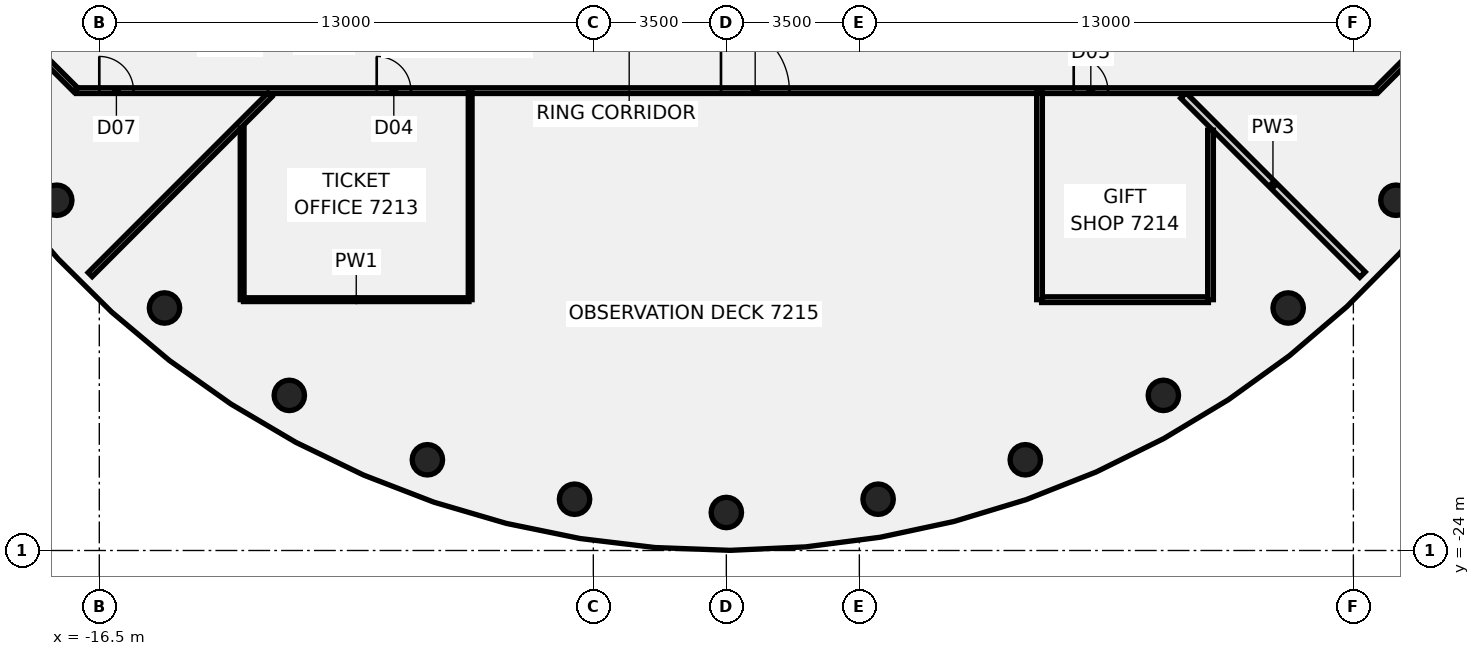
"""IFC4 building model, lengths in metres.
Left out: names, types, materials, properties, quantities, classifications, styles, units other than length and angle.
Written with IfcOpenShell. Run it as: python <this file> out.ifc"""

import sys

from ifc_helpers import new_model, si_unit, direction, frame, frame_2d, origin, origin_2d, place, context, subcontext, project, spatial, rectangle, circle, extrude, element, fill, save


model = new_model("IFC4")
c1 = context("Model", 3, precision=1e-05, world=origin(), true_north=direction((0.0, 1.0)))
c2 = subcontext(c1, "Body", "Model", "MODEL_VIEW")
j1 = project(units=[si_unit("LENGTHUNIT", "METRE"), si_unit("PLANEANGLEUNIT", "RADIAN")], contexts=[c1])
p1 = place(None, origin())
s1 = spatial("IfcSite", under=j1, at=p1, CompositionType="ELEMENT")
p2 = place(p1, origin())
s2 = spatial("IfcBuilding", under=s1, at=p2, CompositionType="ELEMENT")
p3 = place(p2, frame((0.0, 0.0, 287.4)))
s3 = spatial("IfcBuildingStorey", under=s2, at=p3, CompositionType="ELEMENT", Elevation=287.4)
for number, where, z_axis, x_axis in (
    (1, (-17.619, -14.784, -0.2), (0.0, 0.0, 1.0), (1.0, 0.0, 0.0)),
    (2, (-14.784, -17.619, -0.2), (0.0, 0.0, 1.0), (1.0, 0.0, 0.0)),
    (3, (-11.5, -19.919, -0.2), (0.0, 0.0, 1.0), (1.0, 0.0, 0.0)),
    (4, (-7.866, -21.613, -0.2), (0.0, 0.0, 1.0), (1.0, 0.0, 0.0)),
    (5, (-3.994, -22.651, -0.2), (0.0, 0.0, 1.0), (1.0, 0.0, 0.0)),
    (6, (0.0, -23.0, -0.2), (0.0, 0.0, 1.0), (1.0, 0.0, 0.0)),
    (7, (3.994, -22.651, -0.2), (0.0, 0.0, 1.0), (1.0, 0.0, 0.0)),
    (8, (7.866, -21.613, -0.2), (0.0, 0.0, 1.0), (1.0, 0.0, 0.0)),
    (9, (11.5, -19.919, -0.2), (0.0, 0.0, 1.0), (1.0, 0.0, 0.0)),
    (10, (14.784, -17.619, -0.2), (0.0, 0.0, 1.0), (1.0, 0.0, 0.0)),
    (11, (17.619, -14.784, -0.2), (0.0, 0.0, 1.0), (1.0, 0.0, 0.0)),
):
    element("IfcColumn", number, at=place(p3, frame(where, z_axis=z_axis, x_axis=x_axis)), inside=s3, PredefinedType="COLUMN", context=c2, shape_type="SweptSolid", body=[
        extrude(circle(Radius=0.4, at=origin_2d()), origin(), (0.0, 0.0, 1.0), 7.0),
    ])
p4 = place(p3, frame((-18.872, -10.128, 0.0), z_axis=(0.0, 0.0, 1.0), x_axis=(0.707106781187, -0.707106781187, 0.0)))
e12 = element("IfcWall", 12, at=p4, inside=s3, PredefinedType="PARTITIONING", context=c2, shape_type="SweptSolid", body=[
    extrude(rectangle(XDim=2.465, YDim=0.15, at=frame_2d((1.232, 0.0))), origin(), (0.0, 0.0, 1.0), 6.1),
])
p5 = place(p3, frame((12.027, -12.027, 0.0), z_axis=(0.0, 0.0, 1.0), x_axis=(0.707106781187, -0.707106781187, 0.0)))
e13 = element("IfcWall", 13, at=p5, inside=s3, PredefinedType="PARTITIONING", context=c2, shape_type="SweptSolid", body=[
    extrude(rectangle(XDim=6.665, YDim=0.2, at=frame_2d((3.333, 0.0))), origin(), (0.0, 0.0, 1.0), 6.1),
])
p6 = place(p3, frame((-17.1, -11.9, 0.0), z_axis=(0.0, 0.0, 1.0), x_axis=(1.0, 0.0, 0.0)))
e14 = element("IfcWall", 14, at=p6, inside=s3, PredefinedType="PARTITIONING", context=c2, shape_type="SweptSolid", body=[
    extrude(rectangle(XDim=34.165, YDim=0.15, at=frame_2d((17.083, 0.0))), origin(), (0.0, 0.0, 1.0), 6.1),
])
p7 = place(p6, frame((7.9, 0.0, 0.0)))
e15 = element("IfcOpeningElement", 15, at=p7, cuts=e14, PredefinedType="OPENING", context=c2, shape_type="SweptSolid", body=[
    extrude(rectangle(XDim=0.9, YDim=2.1, at=frame_2d((0.45, 1.05))), frame((0.0, 0.085, 0.0), z_axis=(0.0, -1.0, 0.0), x_axis=(1.0, 0.0, 0.0)), (0.0, 0.0, 1.0), 0.17),
])
p8 = place(p6, frame((26.241, 0.0, 0.0)))
e16 = element("IfcOpeningElement", 16, at=p8, cuts=e14, PredefinedType="OPENING", context=c2, shape_type="SweptSolid", body=[
    extrude(rectangle(XDim=0.9, YDim=2.1, at=frame_2d((0.45, 1.05))), frame((0.0, 0.085, 0.0), z_axis=(0.0, -1.0, 0.0), x_axis=(1.0, 0.0, 0.0)), (0.0, 0.0, 1.0), 0.17),
])
p9 = place(p6, frame((16.959, 0.0, 0.0)))
e17 = element("IfcOpeningElement", 17, at=p9, cuts=e14, PredefinedType="OPENING", context=c2, shape_type="SweptSolid", body=[
    extrude(rectangle(XDim=1.8, YDim=2.1, at=frame_2d((0.9, 1.05))), frame((0.0, 0.085, 0.0), z_axis=(0.0, -1.0, 0.0), x_axis=(1.0, 0.0, 0.0)), (0.0, 0.0, 1.0), 0.17),
])
p10 = place(p6, frame((0.6, 0.0, 0.0)))
e18 = element("IfcOpeningElement", 18, at=p10, cuts=e14, PredefinedType="OPENING", context=c2, shape_type="SweptSolid", body=[
    extrude(rectangle(XDim=0.9, YDim=2.1, at=frame_2d((0.45, 1.05))), frame((0.0, 0.085, 0.0), z_axis=(0.0, -1.0, 0.0), x_axis=(1.0, 0.0, 0.0)), (0.0, 0.0, 1.0), 0.17),
])
p11 = place(p3, frame((-12.706, -17.4, 0.0), z_axis=(0.0, 0.0, 1.0), x_axis=(1.0, 0.0, 0.0)))
e19 = element("IfcWall", 19, at=p11, inside=s3, PredefinedType="PARTITIONING", context=c2, shape_type="SweptSolid", body=[
    extrude(rectangle(XDim=5.935, YDim=0.1, at=frame_2d((2.968, 0.0))), origin(), (0.0, 0.0, 1.0), 6.1),
])
p12 = place(p3, frame((8.296, -17.4, 0.0), z_axis=(0.0, 0.0, 1.0), x_axis=(1.0, 0.0, 0.0)))
e20 = element("IfcWall", 20, at=p12, inside=s3, PredefinedType="PARTITIONING", context=c2, shape_type="SweptSolid", body=[
    extrude(rectangle(XDim=4.39, YDim=0.15, at=frame_2d((2.195, 0.0))), origin(), (0.0, 0.0, 1.0), 6.1),
])
p13 = place(p3, frame((-16.74, -16.74, 0.0), z_axis=(0.0, 0.0, 1.0), x_axis=(0.707106781187, 0.707106781187, 0.0)))
e21 = element("IfcWall", 21, at=p13, inside=s3, PredefinedType="PARTITIONING", context=c2, shape_type="SweptSolid", body=[
    extrude(rectangle(XDim=6.691, YDim=0.15, at=frame_2d((3.345, 0.0))), origin(), (0.0, 0.0, 1.0), 6.1),
])
p14 = place(p3, frame((17.1, -11.9, 0.0), z_axis=(0.0, 0.0, 1.0), x_axis=(0.707106781187, 0.707106781187, 0.0)))
e22 = element("IfcWall", 22, at=p14, inside=s3, PredefinedType="PARTITIONING", context=c2, shape_type="SweptSolid", body=[
    extrude(rectangle(XDim=2.505, YDim=0.15, at=frame_2d((1.253, 0.0))), origin(), (0.0, 0.0, 1.0), 6.1),
])
p15 = place(p3, frame((-12.741, -17.4, 0.0), z_axis=(0.0, 0.0, 1.0), x_axis=(0.0, 1.0, 0.0)))
e23 = element("IfcWall", 23, at=p15, inside=s3, PredefinedType="PARTITIONING", context=c2, shape_type="SweptSolid", body=[
    extrude(rectangle(XDim=4.519, YDim=0.1, at=frame_2d((2.259, 0.0))), origin(), (0.0, 0.0, 1.0), 6.1),
])
p16 = place(p3, frame((-6.741, -17.4, 0.0), z_axis=(0.0, 0.0, 1.0), x_axis=(0.0, 1.0, 0.0)))
e24 = element("IfcWall", 24, at=p16, inside=s3, PredefinedType="PARTITIONING", context=c2, shape_type="SweptSolid", body=[
    extrude(rectangle(XDim=5.445, YDim=0.1, at=frame_2d((2.722, 0.0))), origin(), (0.0, 0.0, 1.0), 6.1),
])
p17 = place(p3, frame((8.241, -17.4, 0.0), z_axis=(0.0, 0.0, 1.0), x_axis=(0.0, 1.0, 0.0)))
e25 = element("IfcWall", 25, at=p17, inside=s3, PredefinedType="PARTITIONING", context=c2, shape_type="SweptSolid", body=[
    extrude(rectangle(XDim=5.445, YDim=0.15, at=frame_2d((2.722, 0.0))), origin(), (0.0, 0.0, 1.0), 6.1),
])
p18 = place(p3, frame((12.741, -17.4, 0.0), z_axis=(0.0, 0.0, 1.0), x_axis=(0.0, 1.0, 0.0)))
e26 = element("IfcWall", 26, at=p18, inside=s3, PredefinedType="PARTITIONING", context=c2, shape_type="SweptSolid", body=[
    extrude(rectangle(XDim=4.459, YDim=0.15, at=frame_2d((2.229, 0.0))), origin(), (0.0, 0.0, 1.0), 6.1),
])
p19 = place(p7, frame((0.9, 0.0, 0.0), z_axis=(0.0, 0.0, 1.0), x_axis=(-1.0, 0.0, 0.0)))
e27 = element("IfcDoor", 27, at=p19, inside=s3, OperationType="SINGLE_SWING_LEFT", PredefinedType="DOOR", context=c2, shape_type="SweptSolid", body=[
    extrude(rectangle(XDim=0.9, YDim=2.1, at=frame_2d((0.45, 1.05))), frame((0.0, 0.025, 0.0), z_axis=(0.0, -1.0, 0.0), x_axis=(1.0, 0.0, 0.0)), (0.0, 0.0, 1.0), 0.05),
])
fill(e15, e27)
p20 = place(p8, frame((0.9, 0.0, 0.0), z_axis=(0.0, 0.0, 1.0), x_axis=(-1.0, 0.0, 0.0)))
e28 = element("IfcDoor", 28, at=p20, inside=s3, OperationType="SINGLE_SWING_RIGHT", PredefinedType="DOOR", context=c2, shape_type="SweptSolid", body=[
    extrude(rectangle(XDim=0.9, YDim=2.1, at=frame_2d((0.45, 1.05))), frame((0.0, 0.025, 0.0), z_axis=(0.0, -1.0, 0.0), x_axis=(1.0, 0.0, 0.0)), (0.0, 0.0, 1.0), 0.05),
])
fill(e16, e28)
p21 = place(p9, origin())
e29 = element("IfcDoor", 29, at=p21, inside=s3, OperationType="DOUBLE_DOOR_SINGLE_SWING", PredefinedType="DOOR", context=c2, shape_type="SweptSolid", body=[
    extrude(rectangle(XDim=1.8, YDim=2.1, at=frame_2d((0.9, 1.05))), frame((0.0, 0.025, 0.0), z_axis=(0.0, -1.0, 0.0), x_axis=(1.0, 0.0, 0.0)), (0.0, 0.0, 1.0), 0.05),
])
fill(e17, e29)
p22 = place(p10, frame((0.9, 0.0, 0.0), z_axis=(0.0, 0.0, 1.0), x_axis=(-1.0, 0.0, 0.0)))
e30 = element("IfcDoor", 30, at=p22, inside=s3, OperationType="SINGLE_SWING_LEFT", PredefinedType="DOOR", context=c2, shape_type="SweptSolid", body=[
    extrude(rectangle(XDim=0.9, YDim=2.1, at=frame_2d((0.45, 1.05))), frame((0.0, 0.025, 0.0), z_axis=(0.0, -1.0, 0.0), x_axis=(1.0, 0.0, 0.0)), (0.0, 0.0, 1.0), 0.05),
])
fill(e18, e30)
save(model, sys.argv[1])
